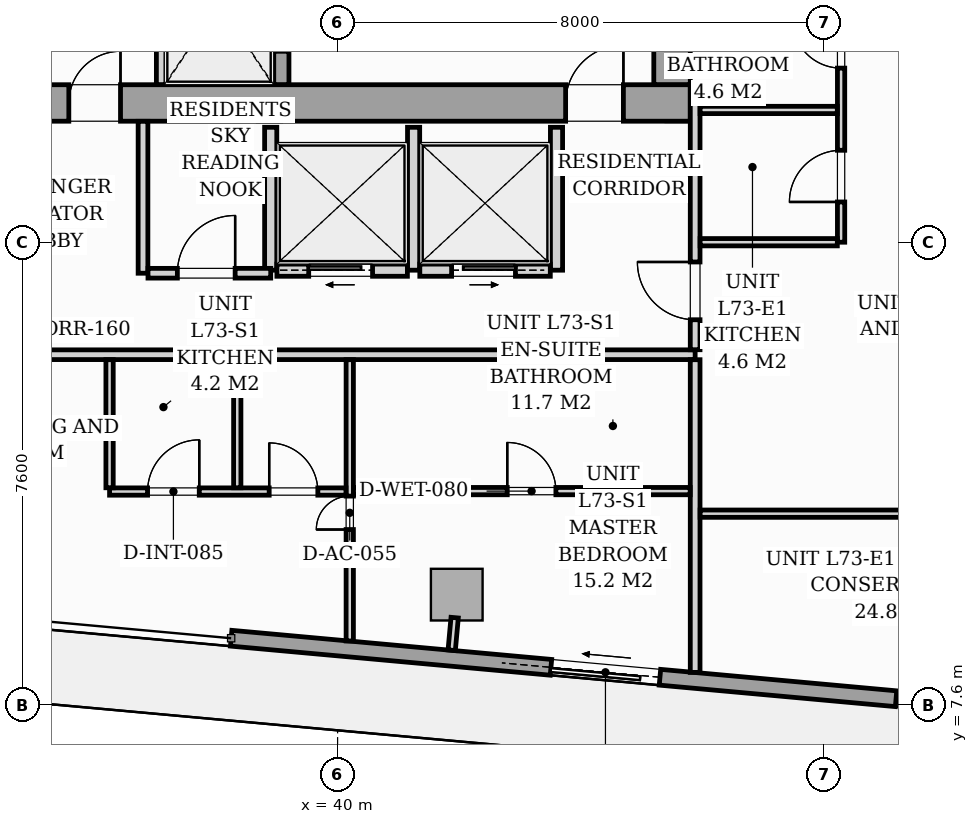
"""IFC4 building model, lengths in metres.
Left out: names, types, materials, properties, quantities, classifications, styles, units other than length and angle.
Written with IfcOpenShell. Run it as: python <this file> out.ifc"""

import sys

from ifc_helpers import new_model, si_unit, direction, frame, frame_2d, origin, origin_2d, place, context, subcontext, project, spatial, rectangle, i_section, extrude, source, transform, mapped, element, fill, save


model = new_model("IFC4")
c1 = context("Model", 3, precision=1e-05, world=origin(), true_north=direction((0.0, 1.0)))
c2 = subcontext(c1, "Body", "Model", "MODEL_VIEW")
j1 = project(units=[si_unit("LENGTHUNIT", "METRE"), si_unit("PLANEANGLEUNIT", "RADIAN")], contexts=[c1])
p1 = place(None, origin())
s1 = spatial("IfcSite", under=j1, at=p1, CompositionType="ELEMENT")
p2 = place(p1, origin())
s2 = spatial("IfcBuilding", under=s1, at=p2, CompositionType="ELEMENT")
p3 = place(p2, frame((0.0, 0.0, 252.9)))
s3 = spatial("IfcBuildingStorey", under=s2, at=p3, CompositionType="ELEMENT", Elevation=252.9)
m1 = source(origin(), c2, "Body", "SweptSolid", [
    extrude(i_section(OverallWidth=0.409, OverallDepth=0.425, WebThickness=0.033, FlangeThickness=0.052, FilletRadius=0.018, at=origin_2d()), origin(), (0.0, 0.0, 1.0), 3.296),
])
for number, where, z_axis, x_axis in (
    (1, (38.88, 17.4, 0.002), (0.0, 0.0, 1.0), (1.0, 0.0, 0.0)),
    (2, (45.6, 17.4, 0.002), (0.0, 0.0, 1.0), (1.0, 0.0, 0.0)),
):
    element("IfcColumn", number, at=place(p3, frame(where, z_axis=z_axis, x_axis=x_axis)), inside=s3, PredefinedType="PILASTER", context=c2, shape_type="MappedRepresentation", body=[
        mapped(m1, transform((0.0, 0.0, 0.0), scale=1.0)),
    ])
m2 = source(origin(), c2, "Body", "SweptSolid", [
    extrude(rectangle(XDim=0.85, YDim=0.85, at=origin_2d()), origin(), (0.0, 0.0, 1.0), 3.296),
])
p4 = place(p3, frame((41.96, 9.415, 0.002), z_axis=(0.0, 0.0, 1.0), x_axis=(0.995884398616, -0.090632580198, 0.0)))
e3 = element("IfcColumn", 3, at=p4, inside=s3, PredefinedType="COLUMN", context=c2, shape_type="MappedRepresentation", body=[
    mapped(m2, transform((0.0, 0.0, 0.0), scale=1.0)),
])
p5 = place(p3, frame((52.819, 7.372, 0.0), z_axis=(0.0, 0.0, 1.0), x_axis=(-0.995884447498, 0.090632043071, 0.0)))
e4 = element("IfcWall", 4, at=p5, inside=s3, PredefinedType="STANDARD", context=c2, shape_type="SweptSolid", body=[
    extrude(rectangle(XDim=14.63, YDim=0.26, at=frame_2d((7.315, 0.0))), origin(), (0.0, 0.0, 1.0), 3.04),
])
p6 = place(p5, frame((7.549, 0.0, 0.0)))
e5 = element("IfcOpeningElement", 5, at=p6, cuts=e4, PredefinedType="OPENING", context=c2, shape_type="SweptSolid", body=[
    extrude(rectangle(XDim=1.8, YDim=2.06, at=frame_2d((0.9, 1.03))), frame((0.0, 0.14, 0.0), z_axis=(0.0, -1.0, 0.0), x_axis=(1.0, 0.0, 0.0)), (0.0, 0.0, 1.0), 0.28),
])
p7 = place(p5, frame((2.05, 0.0, 0.65)))
e6 = element("IfcOpeningElement", 6, at=p7, cuts=e4, PredefinedType="OPENING", context=c2, shape_type="SweptSolid", body=[
    extrude(rectangle(XDim=1.6, YDim=1.5, at=frame_2d((0.8, 0.75))), frame((0.0, 0.14, 0.0), z_axis=(0.0, -1.0, 0.0), x_axis=(1.0, 0.0, 0.0)), (0.0, 0.0, 1.0), 0.28),
])
p8 = place(p3, frame((26.2, 17.5, 0.0), z_axis=(0.0, 0.0, 1.0), x_axis=(1.0, 0.0, 0.0)))
e7 = element("IfcWall", 7, at=p8, inside=s3, PredefinedType="SHEAR", context=c2, shape_type="SweptSolid", body=[
    extrude(rectangle(XDim=19.6, YDim=0.6, at=frame_2d((9.8, 0.0))), origin(), (0.0, 0.0, 1.0), 3.3),
])
p9 = place(p8, frame((0.95, 0.0, 0.0)))
e8 = element("IfcOpeningElement", 8, at=p9, cuts=e7, PredefinedType="OPENING", context=c2, shape_type="SweptSolid", body=[
    extrude(rectangle(XDim=0.95, YDim=2.06, at=frame_2d((0.475, 1.03))), frame((0.0, 0.31, 0.0), z_axis=(0.0, -1.0, 0.0), x_axis=(1.0, 0.0, 0.0)), (0.0, 0.0, 1.0), 0.62),
])
p10 = place(p8, frame((9.38, 0.0, 0.0)))
e9 = element("IfcOpeningElement", 9, at=p10, cuts=e7, PredefinedType="OPENING", context=c2, shape_type="SweptSolid", body=[
    extrude(rectangle(XDim=0.85, YDim=2.0, at=frame_2d((0.425, 1.0))), frame((0.0, 0.31, 0.0), z_axis=(0.0, -1.0, 0.0), x_axis=(1.0, 0.0, 0.0)), (0.0, 0.0, 1.0), 0.62),
])
p11 = place(p8, frame((17.55, 0.0, 0.0)))
e10 = element("IfcOpeningElement", 10, at=p11, cuts=e7, PredefinedType="OPENING", context=c2, shape_type="SweptSolid", body=[
    extrude(rectangle(XDim=0.95, YDim=2.06, at=frame_2d((0.475, 1.03))), frame((0.0, 0.31, 0.0), z_axis=(0.0, -1.0, 0.0), x_axis=(1.0, 0.0, 0.0)), (0.0, 0.0, 1.0), 0.62),
])
p12 = place(p3, frame((45.5, 17.802, 0.0), z_axis=(0.0, 0.0, 1.0), x_axis=(0.0, 1.0, 0.0)))
e11 = element("IfcWall", 11, at=p12, inside=s3, PredefinedType="SHEAR", context=c2, shape_type="SweptSolid", body=[
    extrude(rectangle(XDim=5.796, YDim=0.6, at=frame_2d((2.898, 0.0))), origin(), (0.0, 0.0, 1.0), 3.3),
])
p13 = place(p3, frame((37.1, 17.802, 0.0), z_axis=(0.0, 0.0, 1.0), x_axis=(0.0, 1.0, 0.0)))
e12 = element("IfcWall", 12, at=p13, inside=s3, PredefinedType="PARTITIONING", context=c2, shape_type="SweptSolid", body=[
    extrude(rectangle(XDim=2.646, YDim=0.16, at=frame_2d((1.323, 0.0))), origin(), (0.0, 0.0, 1.0), 3.04),
])
p14 = place(p3, frame((39.075, 17.802, 0.0), z_axis=(0.0, 0.0, 1.0), x_axis=(0.0, 1.0, 0.0)))
e13 = element("IfcWall", 13, at=p14, inside=s3, PredefinedType="SOLIDWALL", context=c2, shape_type="SweptSolid", body=[
    extrude(rectangle(XDim=2.646, YDim=0.25, at=frame_2d((1.323, 0.0))), origin(), (0.0, 0.0, 1.0), 3.3),
])
p15 = place(p14, frame((0.548, 0.0, 0.0)))
e14 = element("IfcOpeningElement", 14, at=p15, cuts=e13, PredefinedType="OPENING", context=c2, shape_type="SweptSolid", body=[
    extrude(rectangle(XDim=1.1, YDim=2.08, at=frame_2d((0.55, 1.04))), frame((0.0, 0.135, 0.0), z_axis=(0.0, -1.0, 0.0), x_axis=(1.0, 0.0, 0.0)), (0.0, 0.0, 1.0), 0.27),
])
for number, where, z_axis, x_axis in (
    (15, (38.9, 14.75, 0.0), (0.0, 0.0, 1.0), (0.0, 1.0, 0.0)),
    (16, (41.25, 14.75, 0.0), (0.0, 0.0, 1.0), (0.0, 1.0, 0.0)),
    (17, (43.6, 14.75, 0.0), (0.0, 0.0, 1.0), (0.0, 1.0, 0.0)),
):
    element("IfcWall", number, at=place(p3, frame(where, z_axis=z_axis, x_axis=x_axis)), inside=s3, PredefinedType="PARTITIONING", context=c2, shape_type="SweptSolid", body=[
        extrude(rectangle(XDim=2.35, YDim=0.2, at=frame_2d((1.175, 0.0))), origin(), (0.0, 0.0, 1.0), 3.04),
    ])
p16 = place(p3, frame((39.002, 14.75, 0.0), z_axis=(0.0, 0.0, 1.0), x_axis=(1.0, 0.0, 0.0)))
e18 = element("IfcWall", 18, at=p16, inside=s3, PredefinedType="PARTITIONING", context=c2, shape_type="SweptSolid", body=[
    extrude(rectangle(XDim=2.146, YDim=0.2, at=frame_2d((1.073, 0.0))), origin(), (0.0, 0.0, 1.0), 3.04),
])
p17 = place(p16, frame((0.523, 0.0, 0.0)))
e19 = element("IfcOpeningElement", 19, at=p17, cuts=e18, PredefinedType="OPENING", context=c2, shape_type="SweptSolid", body=[
    extrude(rectangle(XDim=1.05, YDim=2.08, at=frame_2d((0.525, 1.04))), frame((0.0, 0.11, 0.0), z_axis=(0.0, -1.0, 0.0), x_axis=(1.0, 0.0, 0.0)), (0.0, 0.0, 1.0), 0.22),
])
p18 = place(p3, frame((41.352, 14.75, 0.0), z_axis=(0.0, 0.0, 1.0), x_axis=(1.0, 0.0, 0.0)))
e20 = element("IfcWall", 20, at=p18, inside=s3, PredefinedType="PARTITIONING", context=c2, shape_type="SweptSolid", body=[
    extrude(rectangle(XDim=2.146, YDim=0.2, at=frame_2d((1.073, 0.0))), origin(), (0.0, 0.0, 1.0), 3.04),
])
p19 = place(p18, frame((0.523, 0.0, 0.0)))
e21 = element("IfcOpeningElement", 21, at=p19, cuts=e20, PredefinedType="OPENING", context=c2, shape_type="SweptSolid", body=[
    extrude(rectangle(XDim=1.05, YDim=2.08, at=frame_2d((0.525, 1.04))), frame((0.0, 0.11, 0.0), z_axis=(0.0, -1.0, 0.0), x_axis=(1.0, 0.0, 0.0)), (0.0, 0.0, 1.0), 0.22),
])
p20 = place(p3, frame((24.55, 13.36, 0.0), z_axis=(0.0, 0.0, 1.0), x_axis=(1.0, 0.0, 0.0)))
e22 = element("IfcWall", 22, at=p20, inside=s3, PredefinedType="PARTITIONING", context=c2, shape_type="SweptSolid", body=[
    extrude(rectangle(XDim=21.33, YDim=0.16, at=frame_2d((10.665, 0.0))), origin(), (0.0, 0.0, 1.0), 2.605),
])
p21 = place(p20, frame((5.415, 0.0, 0.0)))
e23 = element("IfcOpeningElement", 23, at=p21, cuts=e22, PredefinedType="OPENING", context=c2, shape_type="SweptSolid", body=[
    extrude(rectangle(XDim=0.95, YDim=2.06, at=frame_2d((0.475, 1.03))), frame((0.0, 0.09, 0.0), z_axis=(0.0, -1.0, 0.0), x_axis=(1.0, 0.0, 0.0)), (0.0, 0.0, 1.0), 0.18),
])
p22 = place(p3, frame((45.88, 8.136, 0.0), z_axis=(0.0, 0.0, 1.0), x_axis=(0.0, 1.0, 0.0)))
e24 = element("IfcWall", 24, at=p22, inside=s3, PredefinedType="PARTITIONING", context=c2, shape_type="SweptSolid", body=[
    extrude(rectangle(XDim=5.142, YDim=0.16, at=frame_2d((2.571, 0.0))), origin(), (0.0, 0.0, 1.0), 3.04),
])
p23 = place(p3, frame((45.88, 13.442, 0.0), z_axis=(0.0, 0.0, 1.0), x_axis=(0.0, 1.0, 0.0)))
e25 = element("IfcWall", 25, at=p23, inside=s3, PredefinedType="PARTITIONING", context=c2, shape_type="SweptSolid", body=[
    extrude(rectangle(XDim=4.36, YDim=0.16, at=frame_2d((2.18, 0.0))), origin(), (0.0, 0.0, 1.0), 3.04),
])
p24 = place(p23, frame((0.493, 0.0, 0.0)))
e26 = element("IfcOpeningElement", 26, at=p24, cuts=e25, PredefinedType="OPENING", context=c2, shape_type="SweptSolid", body=[
    extrude(rectangle(XDim=0.95, YDim=2.06, at=frame_2d((0.475, 1.03))), frame((0.0, 0.09, 0.0), z_axis=(0.0, -1.0, 0.0), x_axis=(1.0, 0.0, 0.0)), (0.0, 0.0, 1.0), 0.18),
])
p25 = place(p3, frame((40.2, 8.653, 0.0), z_axis=(0.0, 0.0, 1.0), x_axis=(0.0, 1.0, 0.0)))
e27 = element("IfcWall", 27, at=p25, inside=s3, PredefinedType="PARTITIONING", context=c2, shape_type="SweptSolid", body=[
    extrude(rectangle(XDim=4.625, YDim=0.12, at=frame_2d((2.312, 0.0))), origin(), (0.0, 0.0, 1.0), 3.04),
])
p26 = place(p25, frame((1.832, 0.0, 0.0)))
e28 = element("IfcOpeningElement", 28, at=p26, cuts=e27, PredefinedType="OPENING", context=c2, shape_type="SweptSolid", body=[
    extrude(rectangle(XDim=0.55, YDim=2.0, at=frame_2d((0.275, 1.0))), frame((0.0, 0.07, 0.0), z_axis=(0.0, -1.0, 0.0), x_axis=(1.0, 0.0, 0.0)), (0.0, 0.0, 1.0), 0.14),
])
p27 = place(p3, frame((36.25, 11.11, 0.0), z_axis=(0.0, 0.0, 1.0), x_axis=(1.0, 0.0, 0.0)))
e29 = element("IfcWall", 29, at=p27, inside=s3, PredefinedType="PARTITIONING", context=c2, shape_type="SweptSolid", body=[
    extrude(rectangle(XDim=3.888, YDim=0.12, at=frame_2d((1.944, 0.0))), origin(), (0.0, 0.0, 1.0), 3.04),
])
p28 = place(p27, frame((0.625, 0.0, 0.0)))
e30 = element("IfcOpeningElement", 30, at=p28, cuts=e29, PredefinedType="OPENING", context=c2, shape_type="SweptSolid", body=[
    extrude(rectangle(XDim=0.85, YDim=2.05, at=frame_2d((0.425, 1.025))), frame((0.0, 0.07, 0.0), z_axis=(0.0, -1.0, 0.0), x_axis=(1.0, 0.0, 0.0)), (0.0, 0.0, 1.0), 0.14),
])
p29 = place(p27, frame((2.625, 0.0, 0.0)))
e31 = element("IfcOpeningElement", 31, at=p29, cuts=e29, PredefinedType="OPENING", context=c2, shape_type="SweptSolid", body=[
    extrude(rectangle(XDim=0.8, YDim=2.02, at=frame_2d((0.4, 1.01))), frame((0.0, 0.07, 0.0), z_axis=(0.0, -1.0, 0.0), x_axis=(1.0, 0.0, 0.0)), (0.0, 0.0, 1.0), 0.14),
])
for number, where, z_axis, x_axis in (
    (32, (38.35, 11.172, 0.0), (0.0, 0.0, 1.0), (0.0, 1.0, 0.0)),
    (33, (36.25, 11.172, 0.0), (0.0, 0.0, 1.0), (0.0, 1.0, 0.0)),
):
    element("IfcWall", number, at=place(p3, frame(where, z_axis=z_axis, x_axis=x_axis)), inside=s3, PredefinedType="PARTITIONING", context=c2, shape_type="SweptSolid", body=[
        extrude(rectangle(XDim=2.106, YDim=0.12, at=frame_2d((1.053, 0.0))), origin(), (0.0, 0.0, 1.0), 3.04),
    ])
p30 = place(p3, frame((40.262, 11.117, 0.0), z_axis=(0.0, 0.0, 1.0), x_axis=(1.0, 0.0, 0.0)))
e34 = element("IfcWall", 34, at=p30, inside=s3, PredefinedType="PARTITIONING", context=c2, shape_type="SweptSolid", body=[
    extrude(rectangle(XDim=5.536, YDim=0.12, at=frame_2d((2.768, 0.0))), origin(), (0.0, 0.0, 1.0), 3.04),
])
p31 = place(p30, frame((2.528, 0.0, 0.0)))
e35 = element("IfcOpeningElement", 35, at=p31, cuts=e34, PredefinedType="OPENING", context=c2, shape_type="SweptSolid", body=[
    extrude(rectangle(XDim=0.8, YDim=2.02, at=frame_2d((0.4, 1.01))), frame((0.0, 0.07, 0.0), z_axis=(0.0, -1.0, 0.0), x_axis=(1.0, 0.0, 0.0)), (0.0, 0.0, 1.0), 0.14),
])
p32 = place(p3, frame((48.28, 15.21, 0.0), z_axis=(0.0, 0.0, 1.0), x_axis=(0.0, 1.0, 0.0)))
e36 = element("IfcWall", 36, at=p32, inside=s3, PredefinedType="PARTITIONING", context=c2, shape_type="SweptSolid", body=[
    extrude(rectangle(XDim=4.35, YDim=0.12, at=frame_2d((2.175, 0.0))), origin(), (0.0, 0.0, 1.0), 3.04),
])
p33 = place(p32, frame((0.662, 0.0, 0.0)))
e37 = element("IfcOpeningElement", 37, at=p33, cuts=e36, PredefinedType="OPENING", context=c2, shape_type="SweptSolid", body=[
    extrude(rectangle(XDim=0.85, YDim=2.05, at=frame_2d((0.425, 1.025))), frame((0.0, 0.07, 0.0), z_axis=(0.0, -1.0, 0.0), x_axis=(1.0, 0.0, 0.0)), (0.0, 0.0, 1.0), 0.14),
])
p34 = place(p32, frame((2.863, 0.0, 0.0)))
e38 = element("IfcOpeningElement", 38, at=p34, cuts=e36, PredefinedType="OPENING", context=c2, shape_type="SweptSolid", body=[
    extrude(rectangle(XDim=0.8, YDim=2.02, at=frame_2d((0.4, 1.01))), frame((0.0, 0.07, 0.0), z_axis=(0.0, -1.0, 0.0), x_axis=(1.0, 0.0, 0.0)), (0.0, 0.0, 1.0), 0.14),
])
p35 = place(p3, frame((45.962, 17.385, 0.0), z_axis=(0.0, 0.0, 1.0), x_axis=(1.0, 0.0, 0.0)))
e39 = element("IfcWall", 39, at=p35, inside=s3, PredefinedType="PARTITIONING", context=c2, shape_type="SweptSolid", body=[
    extrude(rectangle(XDim=2.256, YDim=0.12, at=frame_2d((1.128, 0.0))), origin(), (0.0, 0.0, 1.0), 2.382),
])
p36 = place(p3, frame((45.962, 15.21, 0.0), z_axis=(0.0, 0.0, 1.0), x_axis=(1.0, 0.0, 0.0)))
e40 = element("IfcWall", 40, at=p36, inside=s3, PredefinedType="PARTITIONING", context=c2, shape_type="SweptSolid", body=[
    extrude(rectangle(XDim=2.256, YDim=0.12, at=frame_2d((1.128, 0.0))), origin(), (0.0, 0.0, 1.0), 3.04),
])
p37 = place(p3, frame((45.962, 10.746, 0.0), z_axis=(0.0, 0.0, 1.0), x_axis=(1.0, 0.0, 0.0)))
e41 = element("IfcWall", 41, at=p37, inside=s3, PredefinedType="PARTITIONING", context=c2, shape_type="SweptSolid", body=[
    extrude(rectangle(XDim=9.594, YDim=0.12, at=frame_2d((4.797, 0.0))), origin(), (0.0, 0.0, 1.0), 3.04),
])
p38 = place(p37, frame((4.378, 0.0, 0.0)))
e42 = element("IfcOpeningElement", 42, at=p38, cuts=e41, PredefinedType="OPENING", context=c2, shape_type="SweptSolid", body=[
    extrude(rectangle(XDim=0.85, YDim=2.05, at=frame_2d((0.425, 1.025))), frame((0.0, 0.07, 0.0), z_axis=(0.0, -1.0, 0.0), x_axis=(1.0, 0.0, 0.0)), (0.0, 0.0, 1.0), 0.14),
])
p39 = place(p3, frame((36.8, 14.7, 0.0), z_axis=(0.0, 0.0, 1.0), x_axis=(0.0, 1.0, 0.0)))
e43 = element("IfcWall", 43, at=p39, inside=s3, PredefinedType="PARTITIONING", context=c2, shape_type="SweptSolid", body=[
    extrude(rectangle(XDim=2.498, YDim=0.16, at=frame_2d((1.249, 0.0))), origin(), (0.0, 0.0, 1.0), 3.04),
])
p40 = place(p3, frame((36.882, 14.7, 0.0), z_axis=(0.0, 0.0, 1.0), x_axis=(1.0, 0.0, 0.0)))
e44 = element("IfcWall", 44, at=p40, inside=s3, PredefinedType="PARTITIONING", context=c2, shape_type="SweptSolid", body=[
    extrude(rectangle(XDim=2.018, YDim=0.16, at=frame_2d((1.009, 0.0))), origin(), (0.0, 0.0, 1.0), 3.04),
])
p41 = place(p40, frame((0.483, 0.0, 0.0)))
e45 = element("IfcOpeningElement", 45, at=p41, cuts=e44, PredefinedType="OPENING", context=c2, shape_type="SweptSolid", body=[
    extrude(rectangle(XDim=0.95, YDim=2.06, at=frame_2d((0.475, 1.03))), frame((0.0, 0.09, 0.0), z_axis=(0.0, -1.0, 0.0), x_axis=(1.0, 0.0, 0.0)), (0.0, 0.0, 1.0), 0.18),
])
p42 = place(p3, frame((41.925, 9.036, 0.0), z_axis=(0.0, 0.0, 1.0), x_axis=(-0.090740281653, -0.995874591144, 0.0)))
e46 = element("IfcWall", 46, at=p42, inside=s3, PredefinedType="PARTITIONING", context=c2, shape_type="SweptSolid", body=[
    extrude(rectangle(XDim=0.538, YDim=0.12, at=frame_2d((0.269, 0.0))), origin(), (0.0, 0.0, 1.0), 3.04),
])
m3 = source(origin(), c2, "Body", "SweptSolid", [
    extrude(rectangle(XDim=1.8, YDim=2.06, at=frame_2d((0.9, 1.03))), frame((0.0, 0.025, 0.0), z_axis=(0.0, -1.0, 0.0), x_axis=(1.0, 0.0, 0.0)), (0.0, 0.0, 1.0), 0.05),
])
p43 = place(p6, origin())
e47 = element("IfcDoor", 47, at=p43, inside=s3, OperationType="SLIDING_TO_RIGHT", PredefinedType="DOOR", context=c2, shape_type="MappedRepresentation", body=[
    mapped(m3, transform((0.0, 0.0, 0.0), scale=1.0)),
])
fill(e5, e47)
m4 = source(origin(), c2, "Body", "SweptSolid", [
    extrude(rectangle(XDim=1.6, YDim=1.5, at=frame_2d((0.8, 0.75))), frame((0.0, 0.03, 0.0), z_axis=(0.0, -1.0, 0.0), x_axis=(1.0, 0.0, 0.0)), (0.0, 0.0, 1.0), 0.06),
])
p44 = place(p7, origin())
e48 = element("IfcWindow", 48, at=p44, inside=s3, PartitioningType="SINGLE_PANEL", PredefinedType="WINDOW", context=c2, shape_type="MappedRepresentation", body=[
    mapped(m4, transform((0.0, 0.0, 0.0), scale=1.0)),
])
fill(e6, e48)
m5 = source(origin(), c2, "Body", "SweptSolid", [
    extrude(rectangle(XDim=0.85, YDim=2.0, at=frame_2d((0.425, 1.0))), frame((0.0, 0.025, 0.0), z_axis=(0.0, -1.0, 0.0), x_axis=(1.0, 0.0, 0.0)), (0.0, 0.0, 1.0), 0.05),
])
p45 = place(p10, origin())
e49 = element("IfcDoor", 49, at=p45, inside=s3, OperationType="SINGLE_SWING_RIGHT", PredefinedType="DOOR", context=c2, shape_type="MappedRepresentation", body=[
    mapped(m5, transform((0.0, 0.0, 0.0), scale=1.0)),
])
fill(e9, e49)
m6 = source(origin(), c2, "Body", "SweptSolid", [
    extrude(rectangle(XDim=0.95, YDim=2.06, at=frame_2d((0.475, 1.03))), frame((0.0, 0.025, 0.0), z_axis=(0.0, -1.0, 0.0), x_axis=(1.0, 0.0, 0.0)), (0.0, 0.0, 1.0), 0.05),
])
p46 = place(p11, origin())
e50 = element("IfcDoor", 50, at=p46, inside=s3, OperationType="SINGLE_SWING_RIGHT", PredefinedType="DOOR", context=c2, shape_type="MappedRepresentation", body=[
    mapped(m6, transform((0.0, 0.0, 0.0), scale=1.0)),
])
fill(e10, e50)
m7 = source(origin(), c2, "Body", "SweptSolid", [
    extrude(rectangle(XDim=1.05, YDim=2.08, at=frame_2d((0.525, 1.04))), frame((0.0, 0.025, 0.0), z_axis=(0.0, -1.0, 0.0), x_axis=(1.0, 0.0, 0.0)), (0.0, 0.0, 1.0), 0.05),
])
p47 = place(p17, origin())
e51 = element("IfcDoor", 51, at=p47, inside=s3, OperationType="SLIDING_TO_LEFT", PredefinedType="DOOR", context=c2, shape_type="MappedRepresentation", body=[
    mapped(m7, transform((0.0, 0.0, 0.0), scale=1.0)),
])
fill(e19, e51)
p48 = place(p19, origin())
e52 = element("IfcDoor", 52, at=p48, inside=s3, OperationType="SLIDING_TO_RIGHT", PredefinedType="DOOR", context=c2, shape_type="MappedRepresentation", body=[
    mapped(m7, transform((0.0, 0.0, 0.0), scale=1.0)),
])
fill(e21, e52)
m8 = source(origin(), c2, "Body", "SweptSolid", [
    extrude(rectangle(XDim=0.8, YDim=2.02, at=frame_2d((0.4, 1.01))), frame((0.0, 0.025, 0.0), z_axis=(0.0, -1.0, 0.0), x_axis=(1.0, 0.0, 0.0)), (0.0, 0.0, 1.0), 0.05),
])
p49 = place(p31, origin())
e53 = element("IfcDoor", 53, at=p49, inside=s3, OperationType="SINGLE_SWING_LEFT", PredefinedType="DOOR", context=c2, shape_type="MappedRepresentation", body=[
    mapped(m8, transform((0.0, 0.0, 0.0), scale=1.0)),
])
fill(e35, e53)
m9 = source(origin(), c2, "Body", "SweptSolid", [
    extrude(rectangle(XDim=0.55, YDim=2.0, at=frame_2d((0.275, 1.0))), frame((0.0, 0.025, 0.0), z_axis=(0.0, -1.0, 0.0), x_axis=(1.0, 0.0, 0.0)), (0.0, 0.0, 1.0), 0.05),
])
p50 = place(p26, origin())
e54 = element("IfcDoor", 54, at=p50, inside=s3, OperationType="SINGLE_SWING_LEFT", PredefinedType="DOOR", context=c2, shape_type="MappedRepresentation", body=[
    mapped(m9, transform((0.0, 0.0, 0.0), scale=1.0)),
])
fill(e28, e54)
m10 = source(origin(), c2, "Body", "SweptSolid", [
    extrude(rectangle(XDim=0.85, YDim=2.05, at=frame_2d((0.425, 1.025))), frame((0.0, 0.025, 0.0), z_axis=(0.0, -1.0, 0.0), x_axis=(1.0, 0.0, 0.0)), (0.0, 0.0, 1.0), 0.05),
])
p51 = place(p28, origin())
e55 = element("IfcDoor", 55, at=p51, inside=s3, OperationType="SINGLE_SWING_RIGHT", PredefinedType="DOOR", context=c2, shape_type="MappedRepresentation", body=[
    mapped(m10, transform((0.0, 0.0, 0.0), scale=1.0)),
])
fill(e30, e55)
p52 = place(p29, origin())
e56 = element("IfcDoor", 56, at=p52, inside=s3, OperationType="SINGLE_SWING_LEFT", PredefinedType="DOOR", context=c2, shape_type="MappedRepresentation", body=[
    mapped(m8, transform((0.0, 0.0, 0.0), scale=1.0)),
])
fill(e31, e56)
m11 = source(origin(), c2, "Body", "SweptSolid", [
    extrude(rectangle(XDim=0.95, YDim=2.06, at=frame_2d((0.475, 1.03))), frame((0.0, 0.025, 0.0), z_axis=(0.0, -1.0, 0.0), x_axis=(1.0, 0.0, 0.0)), (0.0, 0.0, 1.0), 0.05),
])
p53 = place(p24, origin())
e57 = element("IfcDoor", 57, at=p53, inside=s3, OperationType="SINGLE_SWING_RIGHT", PredefinedType="DOOR", context=c2, shape_type="MappedRepresentation", body=[
    mapped(m11, transform((0.0, 0.0, 0.0), scale=1.0)),
])
fill(e26, e57)
p54 = place(p33, origin())
e58 = element("IfcDoor", 58, at=p54, inside=s3, OperationType="SINGLE_SWING_LEFT", PredefinedType="DOOR", context=c2, shape_type="MappedRepresentation", body=[
    mapped(m10, transform((0.0, 0.0, 0.0), scale=1.0)),
])
fill(e37, e58)
p55 = place(p34, origin())
e59 = element("IfcDoor", 59, at=p55, inside=s3, OperationType="SINGLE_SWING_RIGHT", PredefinedType="DOOR", context=c2, shape_type="MappedRepresentation", body=[
    mapped(m8, transform((0.0, 0.0, 0.0), scale=1.0)),
])
fill(e38, e59)
p56 = place(p41, origin())
e60 = element("IfcDoor", 60, at=p56, inside=s3, OperationType="SINGLE_SWING_RIGHT", PredefinedType="DOOR", context=c2, shape_type="MappedRepresentation", body=[
    mapped(m11, transform((0.0, 0.0, 0.0), scale=1.0)),
])
fill(e45, e60)
save(model, sys.argv[1])
